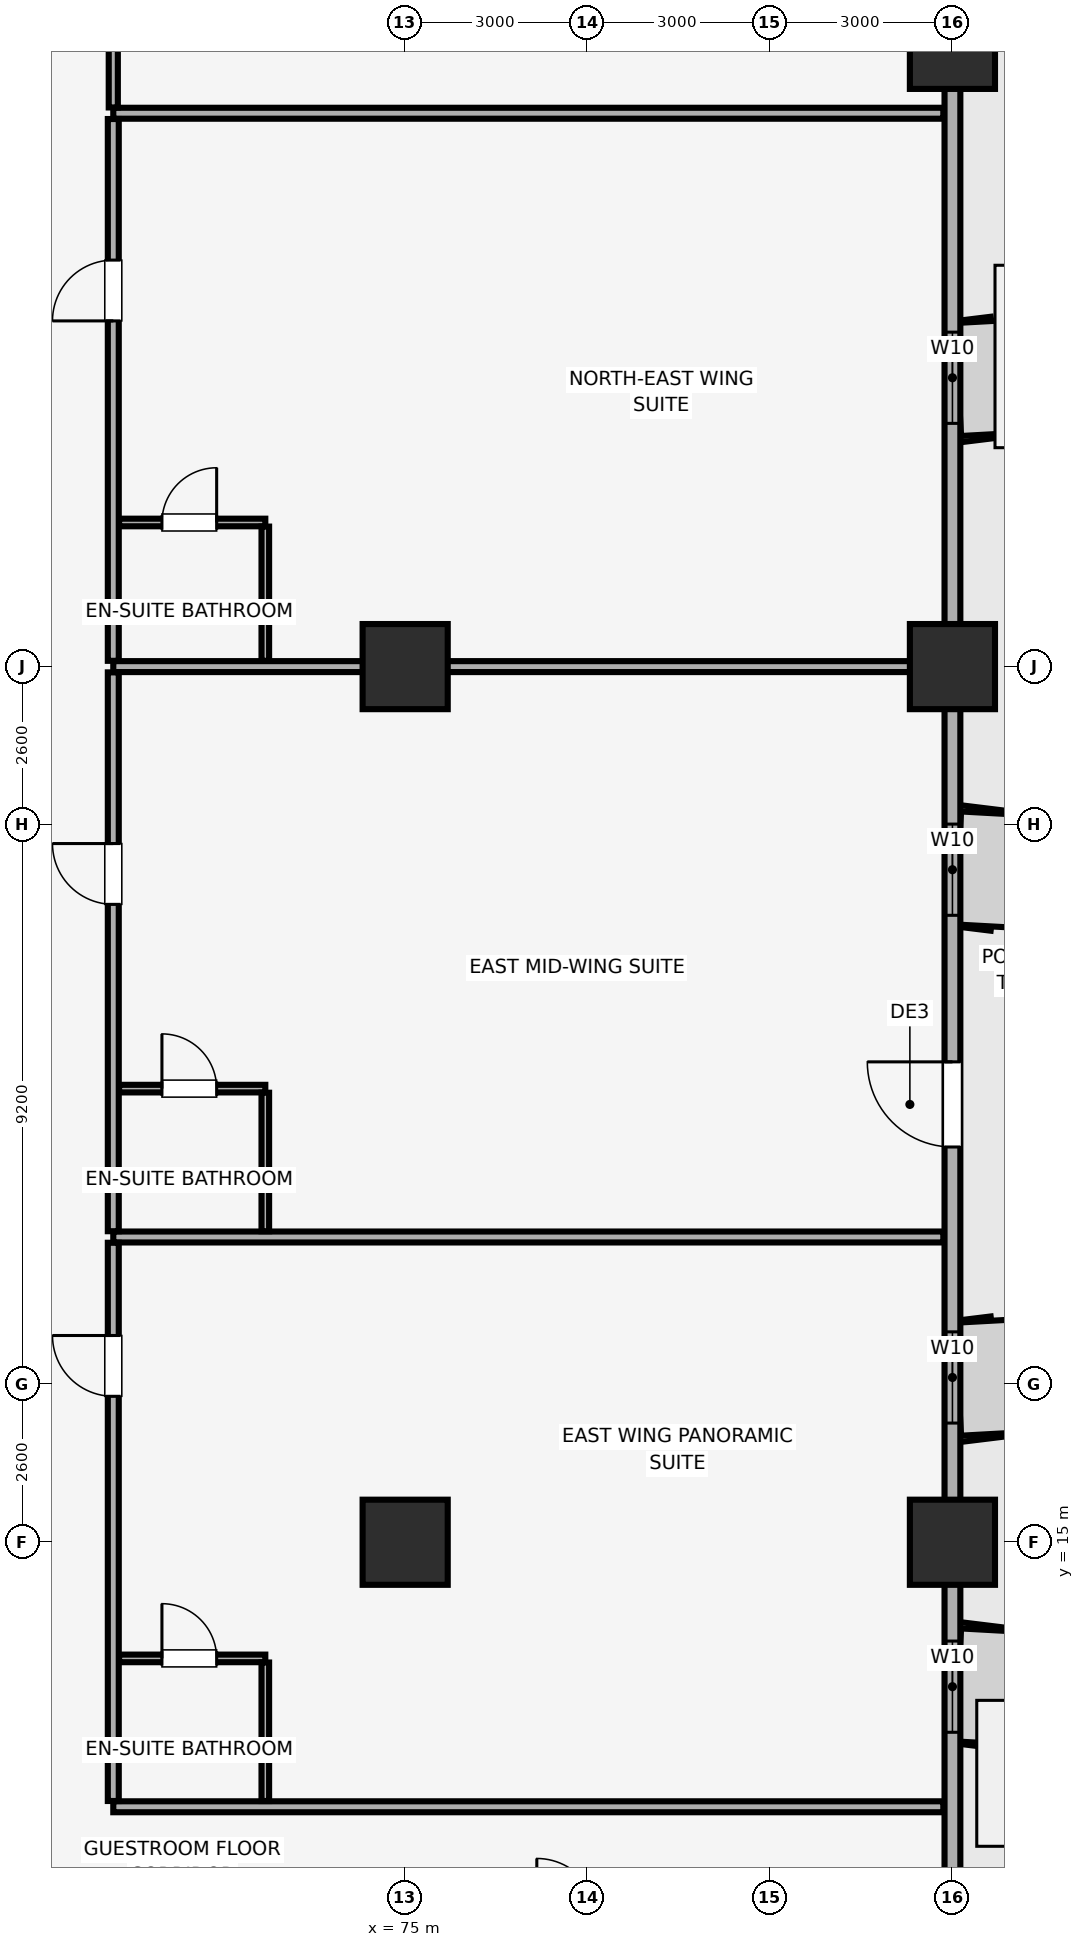
"""IFC4 building model, lengths in metres.
Left out: names, types, materials, properties, quantities, classifications, styles, units other than length and angle.
Written with IfcOpenShell. Run it as: python <this file> out.ifc"""

import sys

from ifc_helpers import new_model, si_unit, direction, frame, frame_2d, origin, origin_2d, place, context, subcontext, project, spatial, rectangle, extrude, element, fill, save


model = new_model("IFC4")
c1 = context("Model", 3, precision=1e-05, world=origin(), true_north=direction((0.0, 1.0)))
c2 = subcontext(c1, "Body", "Model", "MODEL_VIEW")
j1 = project(units=[si_unit("LENGTHUNIT", "METRE"), si_unit("PLANEANGLEUNIT", "RADIAN")], contexts=[c1])
p1 = place(None, origin())
s1 = spatial("IfcSite", under=j1, at=p1, CompositionType="ELEMENT")
p2 = place(p1, origin())
s2 = spatial("IfcBuilding", under=s1, at=p2, CompositionType="ELEMENT")
p3 = place(p2, frame((0.0, 0.0, 31.4)))
s3 = spatial("IfcBuildingStorey", under=s2, at=p3, CompositionType="ELEMENT", Elevation=31.4)
for number, where, z_axis, x_axis in (
    (1, (84.0, 15.0, 0.0), (0.0, 0.0, 1.0), (1.0, 0.0, 0.0)),
    (2, (84.0, 29.4, 0.0), (0.0, 0.0, 1.0), (1.0, 0.0, 0.0)),
    (3, (84.0, 39.6, 0.0), (0.0, 0.0, 1.0), (1.0, 0.0, 0.0)),
    (4, (75.0, 15.0, 0.0), (0.0, 0.0, 1.0), (1.0, 0.0, 0.0)),
    (5, (75.0, 29.4, 0.0), (0.0, 0.0, 1.0), (1.0, 0.0, 0.0)),
):
    element("IfcColumn", number, at=place(p3, frame(where, z_axis=z_axis, x_axis=x_axis)), inside=s3, PredefinedType="COLUMN", context=c2, shape_type="SweptSolid", body=[
        extrude(rectangle(XDim=1.4, YDim=1.4, at=origin_2d()), origin(), (0.0, 0.0, 1.0), 3.51),
    ])
p4 = place(p3, frame((84.0, 4.2, 0.0), z_axis=(0.0, 0.0, 1.0), x_axis=(0.0, 1.0, 0.0)))
e6 = element("IfcWall", 6, at=p4, inside=s3, PredefinedType="SOLIDWALL", context=c2, shape_type="SweptSolid", body=[
    extrude(rectangle(XDim=40.6, YDim=0.26, at=frame_2d((20.3, 0.0))), origin(), (0.0, 0.0, 1.0), 2.56),
])
p5 = place(p4, frame((17.3, 0.0, 0.0)))
e7 = element("IfcOpeningElement", 7, at=p5, cuts=e6, PredefinedType="OPENING", context=c2, shape_type="SweptSolid", body=[
    extrude(rectangle(XDim=1.4, YDim=2.2, at=frame_2d((0.7, 1.1))), frame((0.0, 0.14, 0.0), z_axis=(0.0, -1.0, 0.0), x_axis=(1.0, 0.0, 0.0)), (0.0, 0.0, 1.0), 0.28),
])
p6 = place(p4, frame((7.675, 0.0, 0.85)))
e8 = element("IfcOpeningElement", 8, at=p6, cuts=e6, PredefinedType="OPENING", context=c2, shape_type="SweptSolid", body=[
    extrude(rectangle(XDim=1.5, YDim=1.4, at=frame_2d((0.75, 0.7))), frame((0.0, 0.14, 0.0), z_axis=(0.0, -1.0, 0.0), x_axis=(1.0, 0.0, 0.0)), (0.0, 0.0, 1.0), 0.28),
])
p7 = place(p4, frame((12.76, 0.0, 0.85)))
e9 = element("IfcOpeningElement", 9, at=p7, cuts=e6, PredefinedType="OPENING", context=c2, shape_type="SweptSolid", body=[
    extrude(rectangle(XDim=1.5, YDim=1.4, at=frame_2d((0.75, 0.7))), frame((0.0, 0.14, 0.0), z_axis=(0.0, -1.0, 0.0), x_axis=(1.0, 0.0, 0.0)), (0.0, 0.0, 1.0), 0.28),
])
p8 = place(p4, frame((21.11, 0.0, 0.85)))
e10 = element("IfcOpeningElement", 10, at=p8, cuts=e6, PredefinedType="OPENING", context=c2, shape_type="SweptSolid", body=[
    extrude(rectangle(XDim=1.5, YDim=1.4, at=frame_2d((0.75, 0.7))), frame((0.0, 0.14, 0.0), z_axis=(0.0, -1.0, 0.0), x_axis=(1.0, 0.0, 0.0)), (0.0, 0.0, 1.0), 0.28),
])
p9 = place(p4, frame((29.2, 0.0, 0.85)))
e11 = element("IfcOpeningElement", 11, at=p9, cuts=e6, PredefinedType="OPENING", context=c2, shape_type="SweptSolid", body=[
    extrude(rectangle(XDim=1.5, YDim=1.4, at=frame_2d((0.75, 0.7))), frame((0.0, 0.14, 0.0), z_axis=(0.0, -1.0, 0.0), x_axis=(1.0, 0.0, 0.0)), (0.0, 0.0, 1.0), 0.28),
])
p10 = place(p4, frame((37.365, 0.0, 0.85)))
e12 = element("IfcOpeningElement", 12, at=p10, cuts=e6, PredefinedType="OPENING", context=c2, shape_type="SweptSolid", body=[
    extrude(rectangle(XDim=1.5, YDim=1.4, at=frame_2d((0.75, 0.7))), frame((0.0, 0.14, 0.0), z_axis=(0.0, -1.0, 0.0), x_axis=(1.0, 0.0, 0.0)), (0.0, 0.0, 1.0), 0.28),
])
for number, where, z_axis, x_axis in (
    (13, (70.2, 10.65, 0.0), (0.0, 0.0, 1.0), (1.0, 0.0, 0.0)),
    (14, (70.2, 20.02, 0.0), (0.0, 0.0, 1.0), (1.0, 0.0, 0.0)),
):
    element("IfcWall", number, at=place(p3, frame(where, z_axis=z_axis, x_axis=x_axis)), inside=s3, PredefinedType="PARTITIONING", context=c2, shape_type="SweptSolid", body=[
        extrude(rectangle(XDim=13.65, YDim=0.18, at=frame_2d((6.825, 0.0))), origin(), (0.0, 0.0, 1.0), 3.51),
    ])
p11 = place(p3, frame((70.2, 10.745, 0.0), z_axis=(0.0, 0.0, 1.0), x_axis=(0.0, 1.0, 0.0)))
e15 = element("IfcWall", 15, at=p11, inside=s3, PredefinedType="PARTITIONING", context=c2, shape_type="SweptSolid", body=[
    extrude(rectangle(XDim=9.18, YDim=0.18, at=frame_2d((4.59, 0.0))), origin(), (0.0, 0.0, 1.0), 3.51),
])
p12 = place(p11, frame((6.655, 0.0, 0.0)))
e16 = element("IfcOpeningElement", 16, at=p12, cuts=e15, PredefinedType="OPENING", context=c2, shape_type="SweptSolid", body=[
    extrude(rectangle(XDim=1.0, YDim=2.15, at=frame_2d((0.5, 1.075))), frame((0.0, 0.1, 0.0), z_axis=(0.0, -1.0, 0.0), x_axis=(1.0, 0.0, 0.0)), (0.0, 0.0, 1.0), 0.2),
])
p13 = place(p3, frame((70.295, 13.09, 0.0), z_axis=(0.0, 0.0, 1.0), x_axis=(1.0, 0.0, 0.0)))
e17 = element("IfcWall", 17, at=p13, inside=s3, PredefinedType="PARTITIONING", context=c2, shape_type="SweptSolid", body=[
    extrude(rectangle(XDim=2.405, YDim=0.125, at=frame_2d((1.203, 0.0))), origin(), (0.0, 0.0, 1.0), 3.51),
])
p14 = place(p13, frame((0.705, 0.0, 0.0)))
e18 = element("IfcOpeningElement", 18, at=p14, cuts=e17, PredefinedType="OPENING", context=c2, shape_type="SweptSolid", body=[
    extrude(rectangle(XDim=0.9, YDim=2.1, at=frame_2d((0.45, 1.05))), frame((0.0, 0.073, 0.0), z_axis=(0.0, -1.0, 0.0), x_axis=(1.0, 0.0, 0.0)), (0.0, 0.0, 1.0), 0.145),
])
p15 = place(p3, frame((72.7, 10.745, 0.0), z_axis=(0.0, 0.0, 1.0), x_axis=(0.0, 1.0, 0.0)))
e19 = element("IfcWall", 19, at=p15, inside=s3, PredefinedType="PARTITIONING", context=c2, shape_type="SweptSolid", body=[
    extrude(rectangle(XDim=2.277, YDim=0.125, at=frame_2d((1.139, 0.0))), origin(), (0.0, 0.0, 1.0), 3.51),
])
p16 = place(p3, frame((70.2, 29.4, 0.0), z_axis=(0.0, 0.0, 1.0), x_axis=(1.0, 0.0, 0.0)))
e20 = element("IfcWall", 20, at=p16, inside=s3, PredefinedType="PARTITIONING", context=c2, shape_type="SweptSolid", body=[
    extrude(rectangle(XDim=13.65, YDim=0.18, at=frame_2d((6.825, 0.0))), origin(), (0.0, 0.0, 1.0), 2.86),
])
p17 = place(p3, frame((70.2, 20.115, 0.0), z_axis=(0.0, 0.0, 1.0), x_axis=(0.0, 1.0, 0.0)))
e21 = element("IfcWall", 21, at=p17, inside=s3, PredefinedType="PARTITIONING", context=c2, shape_type="SweptSolid", body=[
    extrude(rectangle(XDim=9.19, YDim=0.18, at=frame_2d((4.595, 0.0))), origin(), (0.0, 0.0, 1.0), 3.51),
])
p18 = place(p17, frame((5.375, 0.0, 0.0)))
e22 = element("IfcOpeningElement", 22, at=p18, cuts=e21, PredefinedType="OPENING", context=c2, shape_type="SweptSolid", body=[
    extrude(rectangle(XDim=1.0, YDim=2.15, at=frame_2d((0.5, 1.075))), frame((0.0, 0.1, 0.0), z_axis=(0.0, -1.0, 0.0), x_axis=(1.0, 0.0, 0.0)), (0.0, 0.0, 1.0), 0.2),
])
p19 = place(p3, frame((70.295, 22.46, 0.0), z_axis=(0.0, 0.0, 1.0), x_axis=(1.0, 0.0, 0.0)))
e23 = element("IfcWall", 23, at=p19, inside=s3, PredefinedType="PARTITIONING", context=c2, shape_type="SweptSolid", body=[
    extrude(rectangle(XDim=2.405, YDim=0.125, at=frame_2d((1.203, 0.0))), origin(), (0.0, 0.0, 1.0), 3.51),
])
p20 = place(p19, frame((0.705, 0.0, 0.0)))
e24 = element("IfcOpeningElement", 24, at=p20, cuts=e23, PredefinedType="OPENING", context=c2, shape_type="SweptSolid", body=[
    extrude(rectangle(XDim=0.9, YDim=2.1, at=frame_2d((0.45, 1.05))), frame((0.0, 0.073, 0.0), z_axis=(0.0, -1.0, 0.0), x_axis=(1.0, 0.0, 0.0)), (0.0, 0.0, 1.0), 0.145),
])
p21 = place(p3, frame((72.7, 20.115, 0.0), z_axis=(0.0, 0.0, 1.0), x_axis=(0.0, 1.0, 0.0)))
e25 = element("IfcWall", 25, at=p21, inside=s3, PredefinedType="PARTITIONING", context=c2, shape_type="SweptSolid", body=[
    extrude(rectangle(XDim=2.278, YDim=0.125, at=frame_2d((1.139, 0.0))), origin(), (0.0, 0.0, 1.0), 3.51),
])
p22 = place(p3, frame((70.2, 38.5, 0.0), z_axis=(0.0, 0.0, 1.0), x_axis=(1.0, 0.0, 0.0)))
e26 = element("IfcWall", 26, at=p22, inside=s3, PredefinedType="PARTITIONING", context=c2, shape_type="SweptSolid", body=[
    extrude(rectangle(XDim=13.65, YDim=0.18, at=frame_2d((6.825, 0.0))), origin(), (0.0, 0.0, 1.0), 3.51),
])
p23 = place(p3, frame((70.2, 29.495, 0.0), z_axis=(0.0, 0.0, 1.0), x_axis=(0.0, 1.0, 0.0)))
e27 = element("IfcWall", 27, at=p23, inside=s3, PredefinedType="PARTITIONING", context=c2, shape_type="SweptSolid", body=[
    extrude(rectangle(XDim=8.91, YDim=0.18, at=frame_2d((4.455, 0.0))), origin(), (0.0, 0.0, 1.0), 3.51),
])
p24 = place(p23, frame((5.59, 0.0, 0.0)))
e28 = element("IfcOpeningElement", 28, at=p24, cuts=e27, PredefinedType="OPENING", context=c2, shape_type="SweptSolid", body=[
    extrude(rectangle(XDim=1.0, YDim=2.15, at=frame_2d((0.5, 1.075))), frame((0.0, 0.1, 0.0), z_axis=(0.0, -1.0, 0.0), x_axis=(1.0, 0.0, 0.0)), (0.0, 0.0, 1.0), 0.2),
])
p25 = place(p3, frame((70.295, 31.77, 0.0), z_axis=(0.0, 0.0, 1.0), x_axis=(1.0, 0.0, 0.0)))
e29 = element("IfcWall", 29, at=p25, inside=s3, PredefinedType="PARTITIONING", context=c2, shape_type="SweptSolid", body=[
    extrude(rectangle(XDim=2.405, YDim=0.125, at=frame_2d((1.203, 0.0))), origin(), (0.0, 0.0, 1.0), 3.51),
])
p26 = place(p25, frame((0.705, 0.0, 0.0)))
e30 = element("IfcOpeningElement", 30, at=p26, cuts=e29, PredefinedType="OPENING", context=c2, shape_type="SweptSolid", body=[
    extrude(rectangle(XDim=0.9, YDim=2.1, at=frame_2d((0.45, 1.05))), frame((0.0, 0.073, 0.0), z_axis=(0.0, -1.0, 0.0), x_axis=(1.0, 0.0, 0.0)), (0.0, 0.0, 1.0), 0.145),
])
p27 = place(p3, frame((72.7, 29.495, 0.0), z_axis=(0.0, 0.0, 1.0), x_axis=(0.0, 1.0, 0.0)))
e31 = element("IfcWall", 31, at=p27, inside=s3, PredefinedType="PARTITIONING", context=c2, shape_type="SweptSolid", body=[
    extrude(rectangle(XDim=2.207, YDim=0.125, at=frame_2d((1.104, 0.0))), origin(), (0.0, 0.0, 1.0), 3.51),
])
p28 = place(p3, frame((70.2, 38.595, 0.0), z_axis=(0.0, 0.0, 1.0), x_axis=(0.0, 1.0, 0.0)))
e32 = element("IfcWall", 32, at=p28, inside=s3, PredefinedType="PARTITIONING", context=c2, shape_type="SweptSolid", body=[
    extrude(rectangle(XDim=10.255, YDim=0.15, at=frame_2d((5.127, 0.0))), origin(), (0.0, 0.0, 1.0), 3.51),
])
p29 = place(p28, frame((2.255, 0.0, 0.0)))
e33 = element("IfcOpeningElement", 33, at=p29, cuts=e32, PredefinedType="OPENING", context=c2, shape_type="SweptSolid", body=[
    extrude(rectangle(XDim=1.0, YDim=2.15, at=frame_2d((0.5, 1.075))), frame((0.0, 0.085, 0.0), z_axis=(0.0, -1.0, 0.0), x_axis=(1.0, 0.0, 0.0)), (0.0, 0.0, 1.0), 0.17),
])
p30 = place(p3, frame((0.0, 0.0, -0.28)))
p31 = place(p30, frame((85.6, 34.5, 0.23)))
e34 = element("IfcWindow", 34, at=p31, inside=s3, PartitioningType="SINGLE_PANEL", PredefinedType="SKYLIGHT", context=c2, shape_type="SweptSolid", body=[
    extrude(rectangle(XDim=1.8, YDim=3.0, at=origin_2d()), origin(), (0.0, 0.0, 1.0), 0.05),
])
p32 = place(p30, frame((85.6, 11.2, 0.23)))
e35 = element("IfcWindow", 35, at=p32, inside=s3, PartitioningType="SINGLE_PANEL", PredefinedType="SKYLIGHT", context=c2, shape_type="SweptSolid", body=[
    extrude(rectangle(XDim=2.4, YDim=2.4, at=origin_2d()), origin(), (0.0, 0.0, 1.0), 0.05),
])
p33 = place(p5, origin())
e36 = element("IfcDoor", 36, at=p33, inside=s3, OperationType="SINGLE_SWING_RIGHT", PredefinedType="DOOR", context=c2, shape_type="SweptSolid", body=[
    extrude(rectangle(XDim=1.4, YDim=2.2, at=frame_2d((0.7, 1.1))), frame((0.0, 0.025, 0.0), z_axis=(0.0, -1.0, 0.0), x_axis=(1.0, 0.0, 0.0)), (0.0, 0.0, 1.0), 0.05),
])
fill(e7, e36)
p34 = place(p6, origin())
e37 = element("IfcWindow", 37, at=p34, inside=s3, PartitioningType="SINGLE_PANEL", PredefinedType="WINDOW", context=c2, shape_type="SweptSolid", body=[
    extrude(rectangle(XDim=1.5, YDim=1.4, at=frame_2d((0.75, 0.7))), frame((0.0, 0.03, 0.0), z_axis=(0.0, -1.0, 0.0), x_axis=(1.0, 0.0, 0.0)), (0.0, 0.0, 1.0), 0.06),
])
fill(e8, e37)
p35 = place(p7, origin())
e38 = element("IfcWindow", 38, at=p35, inside=s3, PartitioningType="SINGLE_PANEL", PredefinedType="WINDOW", context=c2, shape_type="SweptSolid", body=[
    extrude(rectangle(XDim=1.5, YDim=1.4, at=frame_2d((0.75, 0.7))), frame((0.0, 0.03, 0.0), z_axis=(0.0, -1.0, 0.0), x_axis=(1.0, 0.0, 0.0)), (0.0, 0.0, 1.0), 0.06),
])
fill(e9, e38)
p36 = place(p8, origin())
e39 = element("IfcWindow", 39, at=p36, inside=s3, PartitioningType="SINGLE_PANEL", PredefinedType="WINDOW", context=c2, shape_type="SweptSolid", body=[
    extrude(rectangle(XDim=1.5, YDim=1.4, at=frame_2d((0.75, 0.7))), frame((0.0, 0.03, 0.0), z_axis=(0.0, -1.0, 0.0), x_axis=(1.0, 0.0, 0.0)), (0.0, 0.0, 1.0), 0.06),
])
fill(e10, e39)
p37 = place(p9, origin())
e40 = element("IfcWindow", 40, at=p37, inside=s3, PartitioningType="SINGLE_PANEL", PredefinedType="WINDOW", context=c2, shape_type="SweptSolid", body=[
    extrude(rectangle(XDim=1.5, YDim=1.4, at=frame_2d((0.75, 0.7))), frame((0.0, 0.03, 0.0), z_axis=(0.0, -1.0, 0.0), x_axis=(1.0, 0.0, 0.0)), (0.0, 0.0, 1.0), 0.06),
])
fill(e11, e40)
p38 = place(p12, origin())
e41 = element("IfcDoor", 41, at=p38, inside=s3, OperationType="SINGLE_SWING_RIGHT", PredefinedType="DOOR", context=c2, shape_type="SweptSolid", body=[
    extrude(rectangle(XDim=1.0, YDim=2.15, at=frame_2d((0.5, 1.075))), frame((0.0, 0.025, 0.0), z_axis=(0.0, -1.0, 0.0), x_axis=(1.0, 0.0, 0.0)), (0.0, 0.0, 1.0), 0.05),
])
fill(e16, e41)
p39 = place(p14, origin())
e42 = element("IfcDoor", 42, at=p39, inside=s3, OperationType="SINGLE_SWING_LEFT", PredefinedType="DOOR", context=c2, shape_type="SweptSolid", body=[
    extrude(rectangle(XDim=0.9, YDim=2.1, at=frame_2d((0.45, 1.05))), frame((0.0, 0.025, 0.0), z_axis=(0.0, -1.0, 0.0), x_axis=(1.0, 0.0, 0.0)), (0.0, 0.0, 1.0), 0.05),
])
fill(e18, e42)
p40 = place(p18, origin())
e43 = element("IfcDoor", 43, at=p40, inside=s3, OperationType="SINGLE_SWING_RIGHT", PredefinedType="DOOR", context=c2, shape_type="SweptSolid", body=[
    extrude(rectangle(XDim=1.0, YDim=2.15, at=frame_2d((0.5, 1.075))), frame((0.0, 0.025, 0.0), z_axis=(0.0, -1.0, 0.0), x_axis=(1.0, 0.0, 0.0)), (0.0, 0.0, 1.0), 0.05),
])
fill(e22, e43)
p41 = place(p20, origin())
e44 = element("IfcDoor", 44, at=p41, inside=s3, OperationType="SINGLE_SWING_LEFT", PredefinedType="DOOR", context=c2, shape_type="SweptSolid", body=[
    extrude(rectangle(XDim=0.9, YDim=2.1, at=frame_2d((0.45, 1.05))), frame((0.0, 0.025, 0.0), z_axis=(0.0, -1.0, 0.0), x_axis=(1.0, 0.0, 0.0)), (0.0, 0.0, 1.0), 0.05),
])
fill(e24, e44)
p42 = place(p24, origin())
e45 = element("IfcDoor", 45, at=p42, inside=s3, OperationType="SINGLE_SWING_LEFT", PredefinedType="DOOR", context=c2, shape_type="SweptSolid", body=[
    extrude(rectangle(XDim=1.0, YDim=2.15, at=frame_2d((0.5, 1.075))), frame((0.0, 0.025, 0.0), z_axis=(0.0, -1.0, 0.0), x_axis=(1.0, 0.0, 0.0)), (0.0, 0.0, 1.0), 0.05),
])
fill(e28, e45)
p43 = place(p26, origin())
e46 = element("IfcDoor", 46, at=p43, inside=s3, OperationType="SINGLE_SWING_RIGHT", PredefinedType="DOOR", context=c2, shape_type="SweptSolid", body=[
    extrude(rectangle(XDim=0.9, YDim=2.1, at=frame_2d((0.45, 1.05))), frame((0.0, 0.025, 0.0), z_axis=(0.0, -1.0, 0.0), x_axis=(1.0, 0.0, 0.0)), (0.0, 0.0, 1.0), 0.05),
])
fill(e30, e46)
save(model, sys.argv[1])
